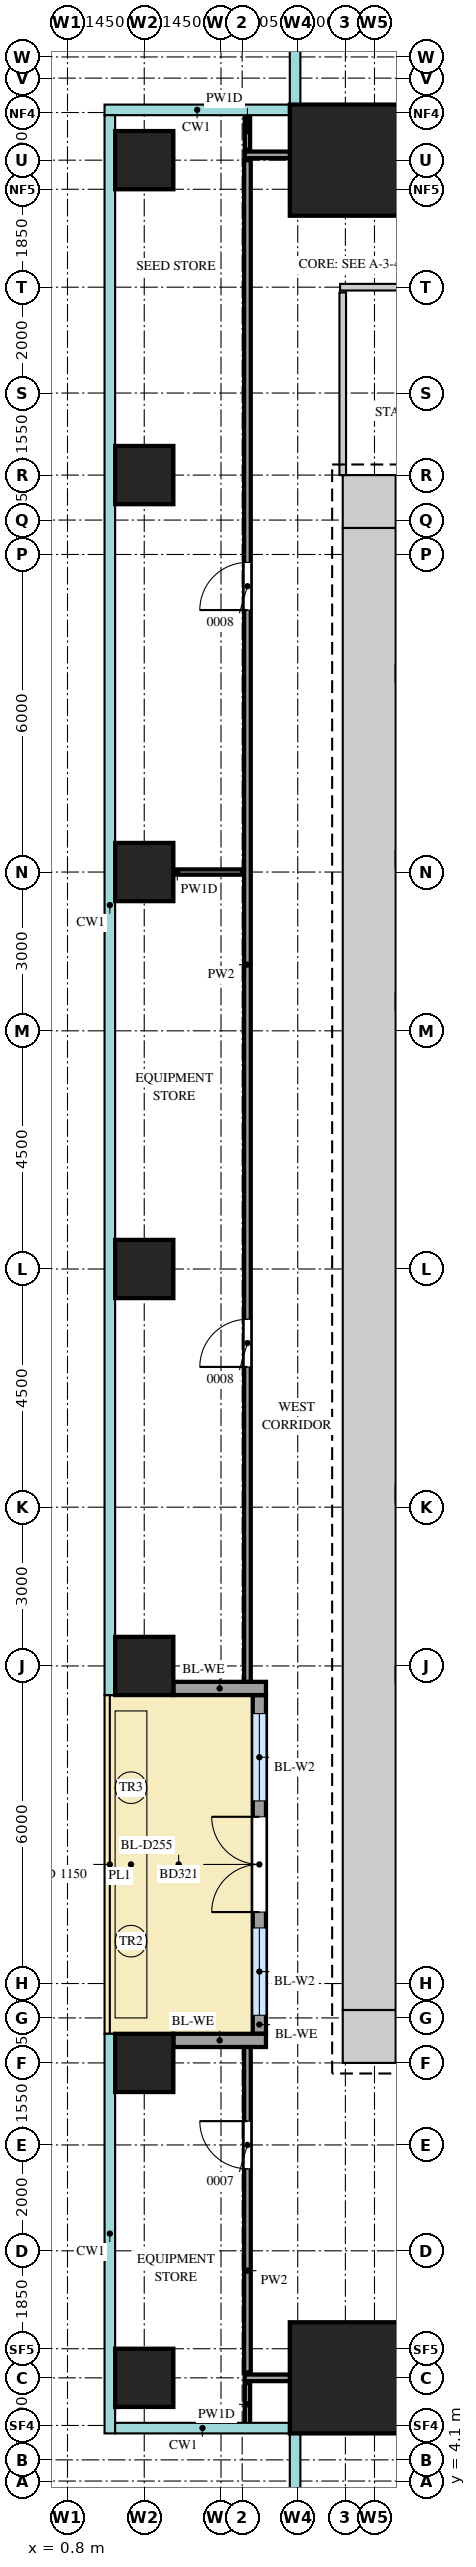
"""IFC4 building model, lengths in metres.
Left out: names, types, materials, properties, quantities, classifications, styles, units other than length and angle.
Written with IfcOpenShell. Run it as: python <this file> out.ifc"""

import sys

from ifc_helpers import new_model, si_unit, direction, frame, frame_2d, origin, origin_2d, place, context, subcontext, project, spatial, rectangle, extrude, source, transform, mapped, element, fill, save


model = new_model("IFC4")
c1 = context("Model", 3, precision=1e-05, world=origin(), true_north=direction((0.0, 1.0)))
c2 = subcontext(c1, "Body", "Model", "MODEL_VIEW")
j1 = project(units=[si_unit("LENGTHUNIT", "METRE"), si_unit("PLANEANGLEUNIT", "RADIAN")], contexts=[c1])
p1 = place(None, origin())
s1 = spatial("IfcSite", under=j1, at=p1, CompositionType="ELEMENT")
p2 = place(p1, origin())
s2 = spatial("IfcBuilding", under=s1, at=p2, CompositionType="ELEMENT")
p3 = place(p2, frame((0.0, 0.0, 149.9)))
s3 = spatial("IfcBuildingStorey", under=s2, at=p3, CompositionType="ELEMENT", Elevation=149.9)
m1 = source(origin(), c2, "Body", "SweptSolid", [
    extrude(rectangle(XDim=1.0, YDim=1.0, at=frame_2d((0.5, 0.0))), origin(), (0.0, 0.0, 1.0), 4.1),
])
for number, where, z_axis, x_axis in (
    (1, (6.0, 41.5, 0.0), (0.0, 0.0, 1.0), (1.0, 0.0, 0.0)),
    (2, (6.0, 12.5, 0.0), (0.0, 0.0, 1.0), (1.0, 0.0, 0.0)),
):
    element("IfcWall", number, at=place(p3, frame(where, z_axis=z_axis, x_axis=x_axis)), inside=s3, PredefinedType="SHEAR", context=c2, shape_type="MappedRepresentation", body=[
        mapped(m1, transform((0.0, 0.0, 0.0))),
    ])
m2 = source(origin(), c2, "Body", "SweptSolid", [
    extrude(rectangle(XDim=28.0, YDim=1.0, at=frame_2d((14.0, 0.0))), origin(), (0.0, 0.0, 1.0), 4.1),
])
p4 = place(p3, frame((6.5, 13.0, 0.0), z_axis=(0.0, 0.0, 1.0), x_axis=(0.0, 1.0, 0.0)))
e3 = element("IfcWall", 3, at=p4, inside=s3, PredefinedType="SHEAR", context=c2, shape_type="MappedRepresentation", body=[
    mapped(m2, transform((0.0, 0.0, 0.0))),
])
m3 = source(origin(), c2, "Body", "SweptSolid", [
    extrude(rectangle(XDim=2.1, YDim=2.1, at=origin_2d()), origin(), (0.0, 0.0, 1.0), 4.4),
])
for number, where, z_axis, x_axis in (
    (4, (6.05, 47.95, 0.0), (0.0, 0.0, 1.0), (1.0, 0.0, 0.0)),
    (5, (6.05, 6.05, 0.0), (0.0, 0.0, 1.0), (1.0, 0.0, 0.0)),
):
    element("IfcColumn", number, at=place(p3, frame(where, z_axis=z_axis, x_axis=x_axis)), inside=s3, PredefinedType="COLUMN", context=c2, shape_type="MappedRepresentation", body=[
        mapped(m3, transform((0.0, 0.0, 0.0))),
    ])
m4 = source(origin(), c2, "Body", "SweptSolid", [
    extrude(rectangle(XDim=1.1, YDim=1.1, at=origin_2d()), origin(), (0.0, 0.0, 1.0), 4.1),
])
for number, where, z_axis, x_axis in (
    (6, (2.25, 6.05, 0.0), (0.0, 0.0, 1.0), (1.0, 0.0, 0.0)),
    (7, (2.25, 12.0, 0.0), (0.0, 0.0, 1.0), (1.0, 0.0, 0.0)),
    (8, (2.25, 19.5, 0.0), (0.0, 0.0, 1.0), (1.0, 0.0, 0.0)),
    (9, (2.25, 27.0, 0.0), (0.0, 0.0, 1.0), (1.0, 0.0, 0.0)),
    (10, (2.25, 34.5, 0.0), (0.0, 0.0, 1.0), (1.0, 0.0, 0.0)),
    (11, (2.25, 42.0, 0.0), (0.0, 0.0, 1.0), (1.0, 0.0, 0.0)),
    (12, (2.25, 47.95, 0.0), (0.0, 0.0, 1.0), (1.0, 0.0, 0.0)),
):
    element("IfcColumn", number, at=place(p3, frame(where, z_axis=z_axis, x_axis=x_axis)), inside=s3, PredefinedType="COLUMN", context=c2, shape_type="MappedRepresentation", body=[
        mapped(m4, transform((0.0, 0.0, 0.0))),
    ])
m5 = source(origin(), c2, "Body", "SweptSolid", [
    extrude(rectangle(XDim=6.4, YDim=0.25, at=frame_2d((3.2, 0.0))), origin(), (0.0, 0.0, 1.0), 3.5),
])
p5 = place(p3, frame((4.425, 12.55, 0.0), z_axis=(0.0, 0.0, 1.0), x_axis=(0.0, 1.0, 0.0)))
e13 = element("IfcWall", 13, at=p5, inside=s3, PredefinedType="SOLIDWALL", context=c2, shape_type="MappedRepresentation", body=[
    mapped(m5, transform((0.0, 0.0, 0.0))),
])
m6 = source(origin(), c2, "Body", "SweptSolid", [
    extrude(rectangle(XDim=1.65, YDim=2.4, at=frame_2d((0.825, 1.2))), frame((0.0, 0.135, 0.0), z_axis=(0.0, -1.0, 0.0), x_axis=(1.0, 0.0, 0.0)), (0.0, 0.0, 1.0), 0.27),
])
p6 = place(p5, frame((0.35, 0.0, 0.0)))
e14 = element("IfcOpeningElement", 14, at=p6, cuts=e13, PredefinedType="OPENING", context=c2, shape_type="MappedRepresentation", body=[
    mapped(m6, transform((0.0, 0.0, 0.0))),
])
p7 = place(p5, frame((4.4, 0.0, 0.0)))
e15 = element("IfcOpeningElement", 15, at=p7, cuts=e13, PredefinedType="OPENING", context=c2, shape_type="MappedRepresentation", body=[
    mapped(m6, transform((0.0, 0.0, 0.0))),
])
m7 = source(origin(), c2, "Body", "SweptSolid", [
    extrude(rectangle(XDim=1.8, YDim=2.4, at=frame_2d((0.9, 1.2))), frame((0.0, 0.135, 0.0), z_axis=(0.0, -1.0, 0.0), x_axis=(1.0, 0.0, 0.0)), (0.0, 0.0, 1.0), 0.27),
])
p8 = place(p5, frame((2.3, 0.0, 0.0)))
e16 = element("IfcOpeningElement", 16, at=p8, cuts=e13, PredefinedType="OPENING", context=c2, shape_type="MappedRepresentation", body=[
    mapped(m7, transform((0.0, 0.0, 0.0))),
])
m8 = source(origin(), c2, "Body", "SweptSolid", [
    extrude(rectangle(XDim=1.75, YDim=0.25, at=frame_2d((0.875, 0.0))), origin(), (0.0, 0.0, 1.0), 3.5),
])
for number, where, z_axis, x_axis in (
    (17, (2.8, 12.425, 0.0), (0.0, 0.0, 1.0), (1.0, 0.0, 0.0)),
    (18, (2.8, 19.075, 0.0), (0.0, 0.0, 1.0), (1.0, 0.0, 0.0)),
):
    element("IfcWall", number, at=place(p3, frame(where, z_axis=z_axis, x_axis=x_axis)), inside=s3, PredefinedType="SOLIDWALL", context=c2, shape_type="MappedRepresentation", body=[
        mapped(m8, transform((0.0, 0.0, 0.0))),
    ])
m9 = source(origin(), c2, "Body", "SweptSolid", [
    extrude(rectangle(XDim=0.8, YDim=0.1, at=frame_2d((0.4, 0.0))), origin(), (0.0, 0.0, 1.0), 4.2),
])
p9 = place(p3, frame((4.2, 5.15, 0.0), z_axis=(0.0, 0.0, 1.0), x_axis=(0.0, 1.0, 0.0)))
e19 = element("IfcWall", 19, at=p9, inside=s3, PredefinedType="PARTITIONING", context=c2, shape_type="MappedRepresentation", body=[
    mapped(m9, transform((0.0, 0.0, 0.0))),
])
m10 = source(origin(), c2, "Body", "SweptSolid", [
    extrude(rectangle(XDim=22.3, YDim=0.125, at=frame_2d((11.15, 0.0))), origin(), (0.0, 0.0, 1.0), 3.55),
])
p10 = place(p3, frame((4.15, 6.05, 0.0), z_axis=(0.0, 0.0, 1.0), x_axis=(1.0, 0.0, 0.0)))
e20 = element("IfcWall", 20, at=p10, inside=s3, PredefinedType="PARTITIONING", context=c2, shape_type="MappedRepresentation", body=[
    mapped(m10, transform((0.0, 0.0, 0.0))),
])
m11 = source(origin(), c2, "Body", "SweptSolid", [
    extrude(rectangle(XDim=0.9, YDim=2.1, at=frame_2d((0.45, 1.05))), frame((0.0, 0.073, 0.0), z_axis=(0.0, -1.0, 0.0), x_axis=(1.0, 0.0, 0.0)), (0.0, 0.0, 1.0), 0.145),
])
p11 = place(p10, frame((3.5, 0.0, 0.0)))
e21 = element("IfcOpeningElement", 21, at=p11, cuts=e20, PredefinedType="OPENING", context=c2, shape_type="MappedRepresentation", body=[
    mapped(m11, transform((0.0, 0.0, 0.0))),
])
p12 = place(p10, frame((14.6, 0.0, 0.0)))
e22 = element("IfcOpeningElement", 22, at=p12, cuts=e20, PredefinedType="OPENING", context=c2, shape_type="MappedRepresentation", body=[
    mapped(m11, transform((0.0, 0.0, 0.0))),
])
m12 = source(origin(), c2, "Body", "SweptSolid", [
    extrude(rectangle(XDim=6.15, YDim=0.125, at=frame_2d((3.075, 0.0))), origin(), (0.0, 0.0, 1.0), 4.2),
])
p13 = place(p3, frame((4.2, 6.15, 0.0), z_axis=(0.0, 0.0, 1.0), x_axis=(0.0, 1.0, 0.0)))
e23 = element("IfcWall", 23, at=p13, inside=s3, PredefinedType="PARTITIONING", context=c2, shape_type="MappedRepresentation", body=[
    mapped(m12, transform((0.0, 0.0, 0.0))),
])
p14 = place(p13, frame((3.85, 0.0, 0.0)))
e24 = element("IfcOpeningElement", 24, at=p14, cuts=e23, PredefinedType="OPENING", context=c2, shape_type="MappedRepresentation", body=[
    mapped(m11, transform((0.0, 0.0, 0.0))),
])
m13 = source(origin(), c2, "Body", "SweptSolid", [
    extrude(rectangle(XDim=28.75, YDim=0.125, at=frame_2d((14.375, 0.0))), origin(), (0.0, 0.0, 1.0), 4.2),
])
p15 = place(p3, frame((4.2, 19.2, 0.0), z_axis=(0.0, 0.0, 1.0), x_axis=(0.0, 1.0, 0.0)))
e25 = element("IfcWall", 25, at=p15, inside=s3, PredefinedType="PARTITIONING", context=c2, shape_type="MappedRepresentation", body=[
    mapped(m13, transform((0.0, 0.0, 0.0))),
])
p16 = place(p15, frame((5.95, 0.0, 0.0)))
e26 = element("IfcOpeningElement", 26, at=p16, cuts=e25, PredefinedType="OPENING", context=c2, shape_type="MappedRepresentation", body=[
    mapped(m11, transform((0.0, 0.0, 0.0))),
])
p17 = place(p15, frame((20.25, 0.0, 0.0)))
e27 = element("IfcOpeningElement", 27, at=p17, cuts=e25, PredefinedType="OPENING", context=c2, shape_type="MappedRepresentation", body=[
    mapped(m11, transform((0.0, 0.0, 0.0))),
])
m14 = source(origin(), c2, "Body", "SweptSolid", [
    extrude(rectangle(XDim=2.45, YDim=0.1, at=frame_2d((1.225, 0.0))), origin(), (0.0, 0.0, 1.0), 4.2),
])
p18 = place(p3, frame((1.65, 34.5, 0.0), z_axis=(0.0, 0.0, 1.0), x_axis=(1.0, 0.0, 0.0)))
e28 = element("IfcWall", 28, at=p18, inside=s3, PredefinedType="PARTITIONING", context=c2, shape_type="MappedRepresentation", body=[
    mapped(m14, transform((0.0, 0.0, 0.0))),
])
m15 = source(origin(), c2, "Body", "SweptSolid", [
    extrude(rectangle(XDim=3.45, YDim=0.125, at=frame_2d((1.725, 0.0))), origin(), (0.0, 0.0, 1.0), 4.2),
])
p19 = place(p3, frame((6.0, 42.0, 0.0), z_axis=(0.0, 0.0, 1.0), x_axis=(0.0, 1.0, 0.0)))
e29 = element("IfcWall", 29, at=p19, inside=s3, PredefinedType="PARTITIONING", context=c2, shape_type="MappedRepresentation", body=[
    mapped(m15, transform((0.0, 0.0, 0.0))),
])
m16 = source(origin(), c2, "Body", "SweptSolid", [
    extrude(rectangle(XDim=7.95, YDim=0.125, at=frame_2d((3.975, 0.0))), origin(), (0.0, 0.0, 1.0), 4.2),
])
p20 = place(p3, frame((5.95, 45.55, 0.0), z_axis=(0.0, 0.0, 1.0), x_axis=(1.0, 0.0, 0.0)))
e30 = element("IfcWall", 30, at=p20, inside=s3, PredefinedType="PARTITIONING", context=c2, shape_type="MappedRepresentation", body=[
    mapped(m16, transform((0.0, 0.0, 0.0))),
])
p21 = place(p20, frame((1.55, 0.0, 0.0)))
e31 = element("IfcOpeningElement", 31, at=p21, cuts=e30, PredefinedType="OPENING", context=c2, shape_type="MappedRepresentation", body=[
    mapped(m11, transform((0.0, 0.0, 0.0))),
])
p22 = place(p20, frame((5.65, 0.0, 0.0)))
e32 = element("IfcOpeningElement", 32, at=p22, cuts=e30, PredefinedType="OPENING", context=c2, shape_type="MappedRepresentation", body=[
    mapped(m11, transform((0.0, 0.0, 0.0))),
])
m17 = source(origin(), c2, "Body", "SweptSolid", [
    extrude(rectangle(XDim=42.2, YDim=0.125, at=frame_2d((21.1, 0.0))), origin(), (0.0, 0.0, 1.0), 3.55),
])
p23 = place(p3, frame((4.15, 48.05, 0.0), z_axis=(0.0, 0.0, 1.0), x_axis=(1.0, 0.0, 0.0)))
e33 = element("IfcWall", 33, at=p23, inside=s3, PredefinedType="PARTITIONING", context=c2, shape_type="MappedRepresentation", body=[
    mapped(m17, transform((0.0, 0.0, 0.0))),
])
p24 = place(p23, frame((7.25, 0.0, 0.0)))
e34 = element("IfcOpeningElement", 34, at=p24, cuts=e33, PredefinedType="OPENING", context=c2, shape_type="MappedRepresentation", body=[
    mapped(m11, transform((0.0, 0.0, 0.0))),
])
p25 = place(p23, frame((22.55, 0.0, 0.0)))
e35 = element("IfcOpeningElement", 35, at=p25, cuts=e33, PredefinedType="OPENING", context=c2, shape_type="MappedRepresentation", body=[
    mapped(m11, transform((0.0, 0.0, 0.0))),
])
p26 = place(p23, frame((35.85, 0.0, 0.0)))
e36 = element("IfcOpeningElement", 36, at=p26, cuts=e33, PredefinedType="OPENING", context=c2, shape_type="MappedRepresentation", body=[
    mapped(m11, transform((0.0, 0.0, 0.0))),
])
m18 = source(origin(), c2, "Body", "SweptSolid", [
    extrude(rectangle(XDim=0.7, YDim=0.1, at=frame_2d((0.35, 0.0))), origin(), (0.0, 0.0, 1.0), 4.2),
])
p27 = place(p3, frame((4.2, 48.15, 0.0), z_axis=(0.0, 0.0, 1.0), x_axis=(0.0, 1.0, 0.0)))
e37 = element("IfcWall", 37, at=p27, inside=s3, PredefinedType="PARTITIONING", context=c2, shape_type="MappedRepresentation", body=[
    mapped(m18, transform((0.0, 0.0, 0.0))),
])
m19 = source(origin(), c2, "Body", "SweptSolid", [
    extrude(rectangle(XDim=1.65, YDim=2.4, at=frame_2d((0.825, 1.2))), frame((0.0, 0.03, 0.0), z_axis=(0.0, -1.0, 0.0), x_axis=(1.0, 0.0, 0.0)), (0.0, 0.0, 1.0), 0.06),
])
p28 = place(p6, origin())
e38 = element("IfcWindow", 38, at=p28, inside=s3, PartitioningType="SINGLE_PANEL", PredefinedType="WINDOW", context=c2, shape_type="MappedRepresentation", body=[
    mapped(m19, transform((0.0, 0.0, 0.0))),
])
fill(e14, e38)
p29 = place(p7, origin())
e39 = element("IfcWindow", 39, at=p29, inside=s3, PartitioningType="SINGLE_PANEL", PredefinedType="WINDOW", context=c2, shape_type="MappedRepresentation", body=[
    mapped(m19, transform((0.0, 0.0, 0.0))),
])
fill(e15, e39)
m20 = source(origin(), c2, "Body", "SweptSolid", [
    extrude(rectangle(XDim=1.8, YDim=2.4, at=frame_2d((0.9, 1.2))), frame((0.0, 0.025, 0.0), z_axis=(0.0, -1.0, 0.0), x_axis=(1.0, 0.0, 0.0)), (0.0, 0.0, 1.0), 0.05),
])
p30 = place(p8, origin())
e40 = element("IfcDoor", 40, at=p30, inside=s3, OperationType="DOUBLE_DOOR_DOUBLE_SWING", PredefinedType="DOOR", context=c2, shape_type="MappedRepresentation", body=[
    mapped(m20, transform((0.0, 0.0, 0.0))),
])
fill(e16, e40)
m21 = source(origin(), c2, "Body", "SweptSolid", [
    extrude(rectangle(XDim=0.9, YDim=2.1, at=frame_2d((0.45, 1.05))), frame((0.0, 0.025, 0.0), z_axis=(0.0, -1.0, 0.0), x_axis=(1.0, 0.0, 0.0)), (0.0, 0.0, 1.0), 0.05),
])
p31 = place(p14, origin())
e41 = element("IfcDoor", 41, at=p31, inside=s3, OperationType="SINGLE_SWING_LEFT", PredefinedType="DOOR", context=c2, shape_type="MappedRepresentation", body=[
    mapped(m21, transform((0.0, 0.0, 0.0))),
])
fill(e24, e41)
p32 = place(p16, origin())
e42 = element("IfcDoor", 42, at=p32, inside=s3, OperationType="SINGLE_SWING_RIGHT", PredefinedType="DOOR", context=c2, shape_type="MappedRepresentation", body=[
    mapped(m21, transform((0.0, 0.0, 0.0))),
])
fill(e26, e42)
p33 = place(p17, origin())
e43 = element("IfcDoor", 43, at=p33, inside=s3, OperationType="SINGLE_SWING_RIGHT", PredefinedType="DOOR", context=c2, shape_type="MappedRepresentation", body=[
    mapped(m21, transform((0.0, 0.0, 0.0))),
])
fill(e27, e43)
save(model, sys.argv[1])
